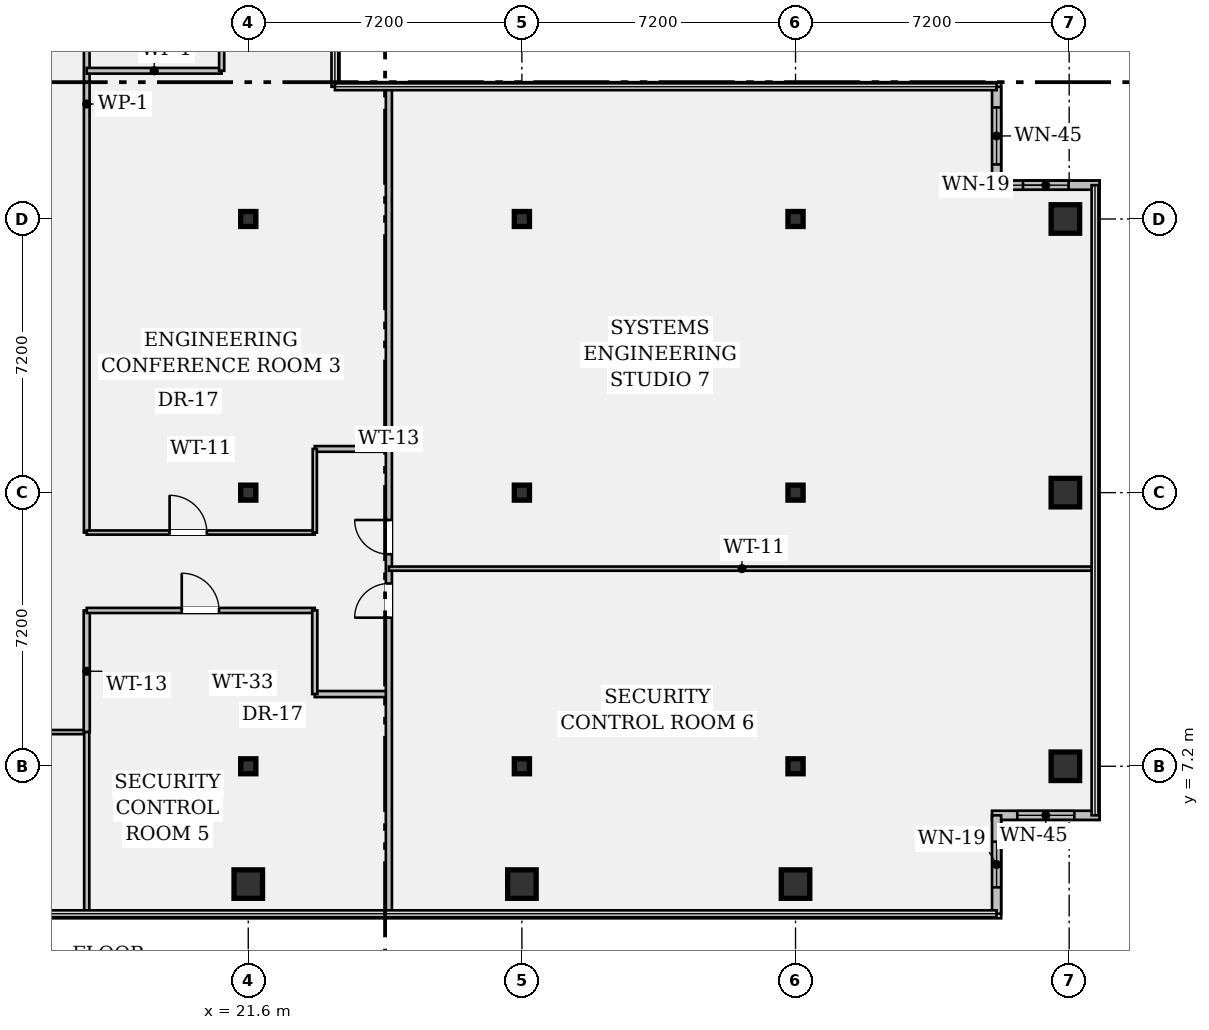
"""IFC4 building model, lengths in metres.
Left out: names, types, materials, properties, quantities, classifications, styles, units other than length and angle.
Written with IfcOpenShell. Run it as: python <this file> out.ifc"""

import sys

from ifc_helpers import new_model, si_unit, direction, frame, frame_2d, origin, origin_2d, place, context, subcontext, project, spatial, rectangle, hollow_rectangle, i_section, extrude, element, fill, save


model = new_model("IFC4")
c1 = context("Model", 3, precision=1e-05, world=origin(), true_north=direction((0.0, 1.0)))
c2 = subcontext(c1, "Body", "Model", "MODEL_VIEW")
j1 = project(units=[si_unit("LENGTHUNIT", "METRE"), si_unit("PLANEANGLEUNIT", "RADIAN")], contexts=[c1])
p1 = place(None, origin())
s1 = spatial("IfcSite", under=j1, at=p1, CompositionType="ELEMENT")
p2 = place(p1, origin())
s2 = spatial("IfcBuilding", under=s1, at=p2, CompositionType="ELEMENT")
p3 = place(p2, frame((0.0, 0.0, 204.75)))
s3 = spatial("IfcBuildingStorey", under=s2, at=p3, CompositionType="ELEMENT", Elevation=204.75)
p4 = place(p3, frame((21.6, 4.1, 0.0), z_axis=(0.0, 0.0, 1.0), x_axis=(1.0, 0.0, 0.0)))
e1 = element("IfcColumn", 1, at=p4, inside=s3, PredefinedType="COLUMN", context=c2, shape_type="SweptSolid", body=[
    extrude(hollow_rectangle(XDim=0.75, YDim=0.75, WallThickness=0.045, at=origin_2d()), origin(), (0.0, 0.0, 1.0), 3.24),
])
for number, where, z_axis, x_axis in (
    (2, (21.6, 7.2, 0.0), (0.0, 0.0, 1.0), (1.0, 0.0, 0.0)),
    (3, (21.6, 14.4, 0.0), (0.0, 0.0, 1.0), (1.0, 0.0, 0.0)),
    (4, (21.6, 21.6, 0.0), (0.0, 0.0, 1.0), (1.0, 0.0, 0.0)),
):
    element("IfcColumn", number, at=place(p3, frame(where, z_axis=z_axis, x_axis=x_axis)), inside=s3, PredefinedType="COLUMN", context=c2, shape_type="SweptSolid", body=[
        extrude(i_section(OverallWidth=0.399, OverallDepth=0.394, WebThickness=0.023, FlangeThickness=0.037, FilletRadius=0.018, at=origin_2d()), origin(), (0.0, 0.0, 1.0), 3.24),
    ])
p5 = place(p3, frame((28.8, 4.1, 0.0), z_axis=(0.0, 0.0, 1.0), x_axis=(1.0, 0.0, 0.0)))
e5 = element("IfcColumn", 5, at=p5, inside=s3, PredefinedType="COLUMN", context=c2, shape_type="SweptSolid", body=[
    extrude(hollow_rectangle(XDim=0.75, YDim=0.75, WallThickness=0.045, at=origin_2d()), origin(), (0.0, 0.0, 1.0), 3.24),
])
for number, where, z_axis, x_axis in (
    (6, (28.8, 7.2, 0.0), (0.0, 0.0, 1.0), (1.0, 0.0, 0.0)),
    (7, (28.8, 14.4, 0.0), (0.0, 0.0, 1.0), (1.0, 0.0, 0.0)),
    (8, (28.8, 21.6, 0.0), (0.0, 0.0, 1.0), (1.0, 0.0, 0.0)),
):
    element("IfcColumn", number, at=place(p3, frame(where, z_axis=z_axis, x_axis=x_axis)), inside=s3, PredefinedType="COLUMN", context=c2, shape_type="SweptSolid", body=[
        extrude(i_section(OverallWidth=0.399, OverallDepth=0.394, WebThickness=0.023, FlangeThickness=0.037, FilletRadius=0.018, at=origin_2d()), origin(), (0.0, 0.0, 1.0), 3.24),
    ])
p6 = place(p3, frame((36.0, 4.1, 0.0), z_axis=(0.0, 0.0, 1.0), x_axis=(1.0, 0.0, 0.0)))
e9 = element("IfcColumn", 9, at=p6, inside=s3, PredefinedType="COLUMN", context=c2, shape_type="SweptSolid", body=[
    extrude(hollow_rectangle(XDim=0.75, YDim=0.75, WallThickness=0.045, at=origin_2d()), origin(), (0.0, 0.0, 1.0), 3.24),
])
for number, where, z_axis, x_axis in (
    (10, (36.0, 7.2, 0.0), (0.0, 0.0, 1.0), (1.0, 0.0, 0.0)),
    (11, (36.0, 14.4, 0.0), (0.0, 0.0, 1.0), (1.0, 0.0, 0.0)),
    (12, (36.0, 21.6, 0.0), (0.0, 0.0, 1.0), (1.0, 0.0, 0.0)),
):
    element("IfcColumn", number, at=place(p3, frame(where, z_axis=z_axis, x_axis=x_axis)), inside=s3, PredefinedType="COLUMN", context=c2, shape_type="SweptSolid", body=[
        extrude(i_section(OverallWidth=0.399, OverallDepth=0.394, WebThickness=0.023, FlangeThickness=0.037, FilletRadius=0.018, at=origin_2d()), origin(), (0.0, 0.0, 1.0), 3.24),
    ])
for number, where, z_axis, x_axis in (
    (13, (43.1, 7.2, 0.0), (0.0, 0.0, 1.0), (1.0, 0.0, 0.0)),
    (14, (43.1, 14.4, 0.0), (0.0, 0.0, 1.0), (1.0, 0.0, 0.0)),
    (15, (43.1, 21.6, 0.0), (0.0, 0.0, 1.0), (1.0, 0.0, 0.0)),
):
    element("IfcColumn", number, at=place(p3, frame(where, z_axis=z_axis, x_axis=x_axis)), inside=s3, PredefinedType="COLUMN", context=c2, shape_type="SweptSolid", body=[
        extrude(hollow_rectangle(XDim=0.75, YDim=0.75, WallThickness=0.045, at=origin_2d()), origin(), (0.0, 0.0, 1.0), 3.24),
    ])
p7 = place(p3, frame((41.29, 25.08, 0.0), z_axis=(0.0, 0.0, 1.0), x_axis=(0.0, -1.0, 0.0)))
e16 = element("IfcWall", 16, at=p7, inside=s3, PredefinedType="STANDARD", context=c2, shape_type="SweptSolid", body=[
    extrude(rectangle(XDim=2.59, YDim=0.24, at=frame_2d((1.295, 0.0))), origin(), (0.0, 0.0, 1.0), 3.24),
])
p8 = place(p7, frame((0.545, 0.0, 0.95)))
e17 = element("IfcOpeningElement", 17, at=p8, cuts=e16, PredefinedType="OPENING", context=c2, shape_type="SweptSolid", body=[
    extrude(rectangle(XDim=1.5, YDim=1.8, at=frame_2d((0.75, 0.9))), frame((0.0, 0.132, 0.0), z_axis=(0.0, -1.0, 0.0), x_axis=(1.0, 0.0, 0.0)), (0.0, 0.0, 1.0), 0.264),
])
p9 = place(p3, frame((41.17, 22.49, 0.0), z_axis=(0.0, 0.0, 1.0), x_axis=(1.0, 0.0, 0.0)))
e18 = element("IfcWall", 18, at=p9, inside=s3, PredefinedType="STANDARD", context=c2, shape_type="SweptSolid", body=[
    extrude(rectangle(XDim=2.83, YDim=0.24, at=frame_2d((1.415, 0.0))), origin(), (0.0, 0.0, 1.0), 3.24),
])
p10 = place(p9, frame((0.815, 0.0, 0.95)))
e19 = element("IfcOpeningElement", 19, at=p10, cuts=e18, PredefinedType="OPENING", context=c2, shape_type="SweptSolid", body=[
    extrude(rectangle(XDim=1.2, YDim=1.8, at=frame_2d((0.6, 0.9))), frame((0.0, 0.132, 0.0), z_axis=(0.0, -1.0, 0.0), x_axis=(1.0, 0.0, 0.0)), (0.0, 0.0, 1.0), 0.264),
])
p11 = place(p3, frame((44.0, 5.91, 0.0), z_axis=(0.0, 0.0, 1.0), x_axis=(-1.0, 0.0, 0.0)))
e20 = element("IfcWall", 20, at=p11, inside=s3, PredefinedType="STANDARD", context=c2, shape_type="SweptSolid", body=[
    extrude(rectangle(XDim=2.83, YDim=0.24, at=frame_2d((1.415, 0.0))), origin(), (0.0, 0.0, 1.0), 3.24),
])
p12 = place(p11, frame((0.665, 0.0, 0.95)))
e21 = element("IfcOpeningElement", 21, at=p12, cuts=e20, PredefinedType="OPENING", context=c2, shape_type="SweptSolid", body=[
    extrude(rectangle(XDim=1.5, YDim=1.8, at=frame_2d((0.75, 0.9))), frame((0.0, 0.132, 0.0), z_axis=(0.0, -1.0, 0.0), x_axis=(1.0, 0.0, 0.0)), (0.0, 0.0, 1.0), 0.264),
])
p13 = place(p3, frame((41.29, 5.91, 0.0), z_axis=(0.0, 0.0, 1.0), x_axis=(0.0, -1.0, 0.0)))
e22 = element("IfcWall", 22, at=p13, inside=s3, PredefinedType="STANDARD", context=c2, shape_type="SweptSolid", body=[
    extrude(rectangle(XDim=2.59, YDim=0.24, at=frame_2d((1.295, 0.0))), origin(), (0.0, 0.0, 1.0), 3.24),
])
p14 = place(p13, frame((0.695, 0.0, 0.95)))
e23 = element("IfcOpeningElement", 23, at=p14, cuts=e22, PredefinedType="OPENING", context=c2, shape_type="SweptSolid", body=[
    extrude(rectangle(XDim=1.2, YDim=1.8, at=frame_2d((0.6, 0.9))), frame((0.0, 0.132, 0.0), z_axis=(0.0, -1.0, 0.0), x_axis=(1.0, 0.0, 0.0)), (0.0, 0.0, 1.0), 0.264),
])
p15 = place(p3, frame((14.4, 8.1, 0.0), z_axis=(0.0, 0.0, 1.0), x_axis=(1.0, 0.0, 0.0)))
e24 = element("IfcWall", 24, at=p15, inside=s3, PredefinedType="PARTITIONING", context=c2, shape_type="SweptSolid", body=[
    extrude(rectangle(XDim=2.95, YDim=0.11, at=frame_2d((1.475, 0.0))), origin(), (0.0, 0.0, 1.0), 2.808),
])
p16 = place(p15, frame((0.95, 0.0, 0.0)))
e25 = element("IfcOpeningElement", 25, at=p16, cuts=e24, PredefinedType="OPENING", context=c2, shape_type="SweptSolid", body=[
    extrude(rectangle(XDim=0.98, YDim=2.15, at=frame_2d((0.49, 1.075))), frame((0.0, 0.067, 0.0), z_axis=(0.0, -1.0, 0.0), x_axis=(1.0, 0.0, 0.0)), (0.0, 0.0, 1.0), 0.134),
])
p17 = place(p3, frame((17.35, 8.1, 0.0), z_axis=(0.0, 0.0, 1.0), x_axis=(0.0, 1.0, 0.0)))
e26 = element("IfcWall", 26, at=p17, inside=s3, PredefinedType="PARTITIONING", context=c2, shape_type="SweptSolid", body=[
    extrude(rectangle(XDim=3.2, YDim=0.16, at=frame_2d((1.6, 0.0))), origin(), (0.0, 0.0, 1.0), 3.24),
])
p18 = place(p3, frame((17.35, 13.35, 0.0), z_axis=(0.0, 0.0, 1.0), x_axis=(0.0, 1.0, 0.0)))
e27 = element("IfcWall", 27, at=p18, inside=s3, PredefinedType="PARTITIONING", context=c2, shape_type="SweptSolid", body=[
    extrude(rectangle(XDim=22.55, YDim=0.15, at=frame_2d((11.275, 0.0))), origin(), (0.0, 0.0, 1.0), 2.613),
])
p19 = place(p18, frame((13.08, 0.0, 0.0)))
e28 = element("IfcOpeningElement", 28, at=p19, cuts=e27, PredefinedType="OPENING", context=c2, shape_type="SweptSolid", body=[
    extrude(rectangle(XDim=0.9, YDim=2.15, at=frame_2d((0.45, 1.075))), frame((0.0, 0.087, 0.0), z_axis=(0.0, -1.0, 0.0), x_axis=(1.0, 0.0, 0.0)), (0.0, 0.0, 1.0), 0.174),
])
p20 = place(p18, frame((15.63, 0.0, 0.0)))
e29 = element("IfcOpeningElement", 29, at=p20, cuts=e27, PredefinedType="OPENING", context=c2, shape_type="SweptSolid", body=[
    extrude(rectangle(XDim=0.9, YDim=2.15, at=frame_2d((0.45, 1.075))), frame((0.0, 0.087, 0.0), z_axis=(0.0, -1.0, 0.0), x_axis=(1.0, 0.0, 0.0)), (0.0, 0.0, 1.0), 0.174),
])
p21 = place(p18, frame((18.18, 0.0, 0.0)))
e30 = element("IfcOpeningElement", 30, at=p21, cuts=e27, PredefinedType="OPENING", context=c2, shape_type="SweptSolid", body=[
    extrude(rectangle(XDim=0.9, YDim=2.15, at=frame_2d((0.45, 1.075))), frame((0.0, 0.087, 0.0), z_axis=(0.0, -1.0, 0.0), x_axis=(1.0, 0.0, 0.0)), (0.0, 0.0, 1.0), 0.174),
])
p22 = place(p18, frame((20.72, 0.0, 0.0)))
e31 = element("IfcOpeningElement", 31, at=p22, cuts=e27, PredefinedType="OPENING", context=c2, shape_type="SweptSolid", body=[
    extrude(rectangle(XDim=0.9, YDim=2.15, at=frame_2d((0.45, 1.075))), frame((0.0, 0.087, 0.0), z_axis=(0.0, -1.0, 0.0), x_axis=(1.0, 0.0, 0.0)), (0.0, 0.0, 1.0), 0.174),
])
p23 = place(p3, frame((17.35, 11.3, 0.0), z_axis=(0.0, 0.0, 1.0), x_axis=(1.0, 0.0, 0.0)))
e32 = element("IfcWall", 32, at=p23, inside=s3, PredefinedType="PARTITIONING", context=c2, shape_type="SweptSolid", body=[
    extrude(rectangle(XDim=6.0, YDim=0.135, at=frame_2d((3.0, 0.0))), origin(), (0.0, 0.0, 1.0), 2.613),
])
p24 = place(p23, frame((2.5, 0.0, 0.0)))
e33 = element("IfcOpeningElement", 33, at=p24, cuts=e32, PredefinedType="OPENING", context=c2, shape_type="SweptSolid", body=[
    extrude(rectangle(XDim=0.98, YDim=2.15, at=frame_2d((0.49, 1.075))), frame((0.0, 0.08, 0.0), z_axis=(0.0, -1.0, 0.0), x_axis=(1.0, 0.0, 0.0)), (0.0, 0.0, 1.0), 0.159),
])
p25 = place(p3, frame((17.35, 13.35, 0.0), z_axis=(0.0, 0.0, 1.0), x_axis=(1.0, 0.0, 0.0)))
e34 = element("IfcWall", 34, at=p25, inside=s3, PredefinedType="PARTITIONING", context=c2, shape_type="SweptSolid", body=[
    extrude(rectangle(XDim=6.0, YDim=0.11, at=frame_2d((3.0, 0.0))), origin(), (0.0, 0.0, 1.0), 2.613),
])
p26 = place(p25, frame((2.18, 0.0, 0.0)))
e35 = element("IfcOpeningElement", 35, at=p26, cuts=e34, PredefinedType="OPENING", context=c2, shape_type="SweptSolid", body=[
    extrude(rectangle(XDim=0.98, YDim=2.15, at=frame_2d((0.49, 1.075))), frame((0.0, 0.067, 0.0), z_axis=(0.0, -1.0, 0.0), x_axis=(1.0, 0.0, 0.0)), (0.0, 0.0, 1.0), 0.134),
])
p27 = place(p3, frame((23.35, 9.1, 0.0), z_axis=(0.0, 0.0, 1.0), x_axis=(1.0, 0.0, 0.0)))
e36 = element("IfcWall", 36, at=p27, inside=s3, PredefinedType="PARTITIONING", context=c2, shape_type="SweptSolid", body=[
    extrude(rectangle(XDim=1.95, YDim=0.16, at=frame_2d((0.975, 0.0))), origin(), (0.0, 0.0, 1.0), 2.808),
])
p28 = place(p3, frame((23.35, 15.55, 0.0), z_axis=(0.0, 0.0, 1.0), x_axis=(1.0, 0.0, 0.0)))
e37 = element("IfcWall", 37, at=p28, inside=s3, PredefinedType="PARTITIONING", context=c2, shape_type="SweptSolid", body=[
    extrude(rectangle(XDim=1.95, YDim=0.15, at=frame_2d((0.975, 0.0))), origin(), (0.0, 0.0, 1.0), 2.808),
])
p29 = place(p3, frame((23.35, 9.1, 0.0), z_axis=(0.0, 0.0, 1.0), x_axis=(0.0, 1.0, 0.0)))
e38 = element("IfcWall", 38, at=p29, inside=s3, PredefinedType="PARTITIONING", context=c2, shape_type="SweptSolid", body=[
    extrude(rectangle(XDim=2.2, YDim=0.135, at=frame_2d((1.1, 0.0))), origin(), (0.0, 0.0, 1.0), 2.808),
])
p30 = place(p3, frame((23.35, 13.35, 0.0), z_axis=(0.0, 0.0, 1.0), x_axis=(0.0, 1.0, 0.0)))
e39 = element("IfcWall", 39, at=p30, inside=s3, PredefinedType="PARTITIONING", context=c2, shape_type="SweptSolid", body=[
    extrude(rectangle(XDim=2.2, YDim=0.11, at=frame_2d((1.1, 0.0))), origin(), (0.0, 0.0, 1.0), 2.613),
])
p31 = place(p3, frame((25.3, 3.32, 0.0), z_axis=(0.0, 0.0, 1.0), x_axis=(0.0, 1.0, 0.0)))
e40 = element("IfcWall", 40, at=p31, inside=s3, PredefinedType="PARTITIONING", context=c2, shape_type="SweptSolid", body=[
    extrude(rectangle(XDim=21.76, YDim=0.16, at=frame_2d((10.88, 0.0))), origin(), (0.0, 0.0, 1.0), 2.613),
])
p32 = place(p31, frame((7.79, 0.0, 0.0)))
e41 = element("IfcOpeningElement", 41, at=p32, cuts=e40, PredefinedType="OPENING", context=c2, shape_type="SweptSolid", body=[
    extrude(rectangle(XDim=0.9, YDim=2.15, at=frame_2d((0.45, 1.075))), frame((0.0, 0.092, 0.0), z_axis=(0.0, -1.0, 0.0), x_axis=(1.0, 0.0, 0.0)), (0.0, 0.0, 1.0), 0.184),
])
p33 = place(p31, frame((9.46, 0.0, 0.0)))
e42 = element("IfcOpeningElement", 42, at=p33, cuts=e40, PredefinedType="OPENING", context=c2, shape_type="SweptSolid", body=[
    extrude(rectangle(XDim=0.9, YDim=2.15, at=frame_2d((0.45, 1.075))), frame((0.0, 0.092, 0.0), z_axis=(0.0, -1.0, 0.0), x_axis=(1.0, 0.0, 0.0)), (0.0, 0.0, 1.0), 0.184),
])
p34 = place(p3, frame((17.35, 25.5, 0.0), z_axis=(0.0, 0.0, 1.0), x_axis=(1.0, 0.0, 0.0)))
e43 = element("IfcWall", 43, at=p34, inside=s3, PredefinedType="PARTITIONING", context=c2, shape_type="SweptSolid", body=[
    extrude(rectangle(XDim=3.55, YDim=0.15, at=frame_2d((1.775, 0.0))), origin(), (0.0, 0.0, 1.0), 2.808),
])
p35 = place(p3, frame((20.9, 25.5, 0.0), z_axis=(0.0, 0.0, 1.0), x_axis=(0.0, 1.0, 0.0)))
e44 = element("IfcWall", 44, at=p35, inside=s3, PredefinedType="PARTITIONING", context=c2, shape_type="SweptSolid", body=[
    extrude(rectangle(XDim=10.4, YDim=0.135, at=frame_2d((5.2, 0.0))), origin(), (0.0, 0.0, 1.0), 2.613),
])
p36 = place(p3, frame((17.35, 3.32, 0.0), z_axis=(0.0, 0.0, 1.0), x_axis=(0.0, 1.0, 0.0)))
e45 = element("IfcWall", 45, at=p36, inside=s3, PredefinedType="PARTITIONING", context=c2, shape_type="SweptSolid", body=[
    extrude(rectangle(XDim=4.78, YDim=0.135, at=frame_2d((2.39, 0.0))), origin(), (0.0, 0.0, 1.0), 2.613),
])
p37 = place(p3, frame((25.3, 12.4, 0.0), z_axis=(0.0, 0.0, 1.0), x_axis=(1.0, 0.0, 0.0)))
e46 = element("IfcWall", 46, at=p37, inside=s3, PredefinedType="PARTITIONING", context=c2, shape_type="SweptSolid", body=[
    extrude(rectangle(XDim=18.58, YDim=0.11, at=frame_2d((9.29, 0.0))), origin(), (0.0, 0.0, 1.0), 2.613),
])
p38 = place(p8, origin())
e47 = element("IfcWindow", 47, at=p38, inside=s3, PartitioningType="SINGLE_PANEL", PredefinedType="WINDOW", context=c2, shape_type="SweptSolid", body=[
    extrude(rectangle(XDim=1.5, YDim=1.8, at=frame_2d((0.75, 0.9))), frame((0.0, 0.03, 0.0), z_axis=(0.0, -1.0, 0.0), x_axis=(1.0, 0.0, 0.0)), (0.0, 0.0, 1.0), 0.06),
])
fill(e17, e47)
p39 = place(p10, origin())
e48 = element("IfcWindow", 48, at=p39, inside=s3, PartitioningType="SINGLE_PANEL", PredefinedType="WINDOW", context=c2, shape_type="SweptSolid", body=[
    extrude(rectangle(XDim=1.2, YDim=1.8, at=frame_2d((0.6, 0.9))), frame((0.0, 0.03, 0.0), z_axis=(0.0, -1.0, 0.0), x_axis=(1.0, 0.0, 0.0)), (0.0, 0.0, 1.0), 0.06),
])
fill(e19, e48)
p40 = place(p12, origin())
e49 = element("IfcWindow", 49, at=p40, inside=s3, PartitioningType="SINGLE_PANEL", PredefinedType="WINDOW", context=c2, shape_type="SweptSolid", body=[
    extrude(rectangle(XDim=1.5, YDim=1.8, at=frame_2d((0.75, 0.9))), frame((0.0, 0.03, 0.0), z_axis=(0.0, -1.0, 0.0), x_axis=(1.0, 0.0, 0.0)), (0.0, 0.0, 1.0), 0.06),
])
fill(e21, e49)
p41 = place(p14, origin())
e50 = element("IfcWindow", 50, at=p41, inside=s3, PartitioningType="SINGLE_PANEL", PredefinedType="WINDOW", context=c2, shape_type="SweptSolid", body=[
    extrude(rectangle(XDim=1.2, YDim=1.8, at=frame_2d((0.6, 0.9))), frame((0.0, 0.03, 0.0), z_axis=(0.0, -1.0, 0.0), x_axis=(1.0, 0.0, 0.0)), (0.0, 0.0, 1.0), 0.06),
])
fill(e23, e50)
p42 = place(p26, origin())
e51 = element("IfcDoor", 51, at=p42, inside=s3, OperationType="SINGLE_SWING_LEFT", PredefinedType="DOOR", context=c2, shape_type="SweptSolid", body=[
    extrude(rectangle(XDim=0.98, YDim=2.15, at=frame_2d((0.49, 1.075))), frame((0.0, 0.025, 0.0), z_axis=(0.0, -1.0, 0.0), x_axis=(1.0, 0.0, 0.0)), (0.0, 0.0, 1.0), 0.05),
])
fill(e35, e51)
p43 = place(p24, origin())
e52 = element("IfcDoor", 52, at=p43, inside=s3, OperationType="SINGLE_SWING_LEFT", PredefinedType="DOOR", context=c2, shape_type="SweptSolid", body=[
    extrude(rectangle(XDim=0.98, YDim=2.15, at=frame_2d((0.49, 1.075))), frame((0.0, 0.025, 0.0), z_axis=(0.0, -1.0, 0.0), x_axis=(1.0, 0.0, 0.0)), (0.0, 0.0, 1.0), 0.05),
])
fill(e33, e52)
p44 = place(p32, origin())
e53 = element("IfcDoor", 53, at=p44, inside=s3, OperationType="SINGLE_SWING_LEFT", PredefinedType="DOOR", context=c2, shape_type="SweptSolid", body=[
    extrude(rectangle(XDim=0.9, YDim=2.15, at=frame_2d((0.45, 1.075))), frame((0.0, 0.025, 0.0), z_axis=(0.0, -1.0, 0.0), x_axis=(1.0, 0.0, 0.0)), (0.0, 0.0, 1.0), 0.05),
])
fill(e41, e53)
p45 = place(p33, origin())
e54 = element("IfcDoor", 54, at=p45, inside=s3, OperationType="SINGLE_SWING_RIGHT", PredefinedType="DOOR", context=c2, shape_type="SweptSolid", body=[
    extrude(rectangle(XDim=0.9, YDim=2.15, at=frame_2d((0.45, 1.075))), frame((0.0, 0.025, 0.0), z_axis=(0.0, -1.0, 0.0), x_axis=(1.0, 0.0, 0.0)), (0.0, 0.0, 1.0), 0.05),
])
fill(e42, e54)
save(model, sys.argv[1])
